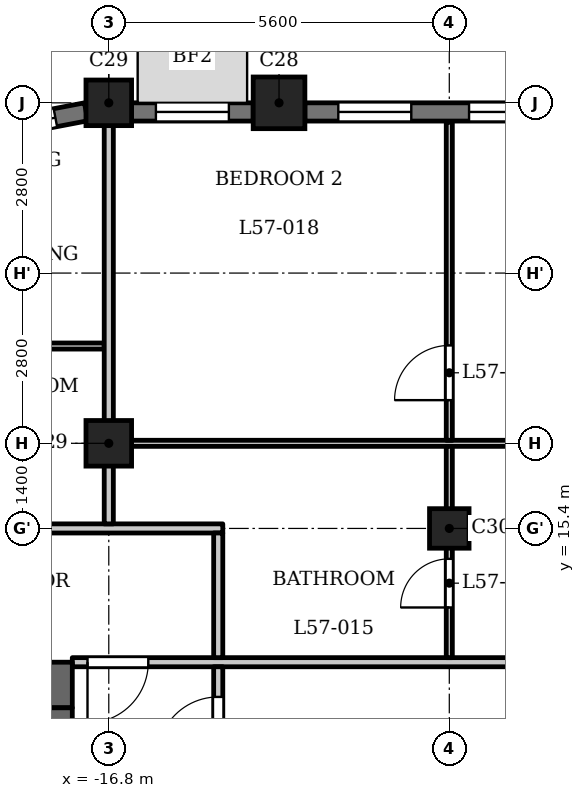
"""IFC4 building model, lengths in metres.
Left out: names, types, materials, properties, quantities, classifications, styles, units other than length and angle.
Written with IfcOpenShell. Run it as: python <this file> out.ifc"""

import sys

from ifc_helpers import new_model, si_unit, direction, frame, frame_2d, origin, origin_2d, place, context, subcontext, project, spatial, rectangle, extrude, element, fill, save


model = new_model("IFC4")
c1 = context("Model", 3, precision=1e-05, world=origin(), true_north=direction((0.0, 1.0)))
c2 = subcontext(c1, "Body", "Model", "MODEL_VIEW")
j1 = project(units=[si_unit("LENGTHUNIT", "METRE"), si_unit("PLANEANGLEUNIT", "RADIAN")], contexts=[c1])
p1 = place(None, origin())
s1 = spatial("IfcSite", under=j1, at=p1, CompositionType="ELEMENT")
p2 = place(p1, origin())
s2 = spatial("IfcBuilding", under=s1, at=p2, CompositionType="ELEMENT")
p3 = place(p2, frame((0.0, 0.0, 220.4)))
s3 = spatial("IfcBuildingStorey", under=s2, at=p3, CompositionType="ELEMENT", Elevation=220.4)
p4 = place(p3, frame((-14.0, 22.4, 0.0), z_axis=(0.0, 0.0, 1.0), x_axis=(1.0, 0.0, 0.0)))
e1 = element("IfcColumn", 1, at=p4, inside=s3, PredefinedType="COLUMN", context=c2, shape_type="SweptSolid", body=[
    extrude(rectangle(XDim=0.85, YDim=0.85, at=origin_2d()), origin(), (0.0, 0.0, 1.0), 3.5),
])
for number, where, z_axis, x_axis in (
    (2, (-16.8, 16.8, 0.0), (0.0, 0.0, 1.0), (1.0, 0.0, 0.0)),
    (3, (-16.8, 22.4, 0.0), (0.0, 0.0, 1.0), (1.0, 0.0, 0.0)),
):
    element("IfcColumn", number, at=place(p3, frame(where, z_axis=z_axis, x_axis=x_axis)), inside=s3, PredefinedType="COLUMN", context=c2, shape_type="SweptSolid", body=[
        extrude(rectangle(XDim=0.75, YDim=0.75, at=origin_2d()), origin(), (0.0, 0.0, 1.0), 3.5),
    ])
p5 = place(p3, frame((-11.2, 15.4, 0.0), z_axis=(0.0, 0.0, 1.0), x_axis=(1.0, 0.0, 0.0)))
e4 = element("IfcColumn", 4, at=p5, inside=s3, PredefinedType="COLUMN", context=c2, shape_type="SweptSolid", body=[
    extrude(rectangle(XDim=0.65, YDim=0.65, at=origin_2d()), origin(), (0.0, 0.0, 1.0), 3.5),
])
p6 = place(p3, frame((-8.825, 22.25, 0.0), z_axis=(0.0, 0.0, 1.0), x_axis=(-1.0, 0.0, 0.0)))
e5 = element("IfcWall", 5, at=p6, inside=s3, PredefinedType="SOLIDWALL", context=c2, shape_type="SweptSolid", body=[
    extrude(rectangle(XDim=4.75, YDim=0.3, at=frame_2d((2.375, 0.0))), origin(), (0.0, 0.0, 1.0), 2.5),
])
p7 = place(p6, frame((0.25, 0.0, 0.9)))
e6 = element("IfcOpeningElement", 6, at=p7, cuts=e5, PredefinedType="OPENING", context=c2, shape_type="SweptSolid", body=[
    extrude(rectangle(XDim=1.8, YDim=1.25, at=frame_2d((0.9, 0.625))), frame((0.0, 0.16, 0.0), z_axis=(0.0, -1.0, 0.0), x_axis=(1.0, 0.0, 0.0)), (0.0, 0.0, 1.0), 0.32),
])
p8 = place(p6, frame((3.0, 0.0, 0.6)))
e7 = element("IfcOpeningElement", 7, at=p8, cuts=e5, PredefinedType="OPENING", context=c2, shape_type="SweptSolid", body=[
    extrude(rectangle(XDim=1.2, YDim=1.55, at=frame_2d((0.6, 0.775))), frame((0.0, 0.16, 0.0), z_axis=(0.0, -1.0, 0.0), x_axis=(1.0, 0.0, 0.0)), (0.0, 0.0, 1.0), 0.32),
])
p9 = place(p3, frame((-14.425, 22.25, 0.0), z_axis=(0.0, 0.0, 1.0), x_axis=(-1.0, 0.0, 0.0)))
e8 = element("IfcWall", 8, at=p9, inside=s3, PredefinedType="SOLIDWALL", context=c2, shape_type="SweptSolid", body=[
    extrude(rectangle(XDim=2.0, YDim=0.3, at=frame_2d((1.0, 0.0))), origin(), (0.0, 0.0, 1.0), 2.5),
])
p10 = place(p9, frame((0.4, 0.0, 0.6)))
e9 = element("IfcOpeningElement", 9, at=p10, cuts=e8, PredefinedType="OPENING", context=c2, shape_type="SweptSolid", body=[
    extrude(rectangle(XDim=1.2, YDim=1.55, at=frame_2d((0.6, 0.775))), frame((0.0, 0.16, 0.0), z_axis=(0.0, -1.0, 0.0), x_axis=(1.0, 0.0, 0.0)), (0.0, 0.0, 1.0), 0.32),
])
p11 = place(p3, frame((-17.172, 22.253, 0.0), z_axis=(0.0, 0.0, 1.0), x_axis=(-0.982300037503, -0.187314271538, 0.0)))
e10 = element("IfcWall", 10, at=p11, inside=s3, PredefinedType="SOLIDWALL", context=c2, shape_type="SweptSolid", body=[
    extrude(rectangle(XDim=1.831, YDim=0.3, at=frame_2d((0.916, 0.0))), origin(), (0.0, 0.0, 1.0), 2.5),
])
p12 = place(p11, frame((0.516, 0.0, 0.6)))
e11 = element("IfcOpeningElement", 11, at=p12, cuts=e10, PredefinedType="OPENING", context=c2, shape_type="SweptSolid", body=[
    extrude(rectangle(XDim=0.8, YDim=1.55, at=frame_2d((0.4, 0.775))), frame((0.0, 0.16, 0.0), z_axis=(0.0, -1.0, 0.0), x_axis=(1.0, 0.0, 0.0)), (0.0, 0.0, 1.0), 0.32),
])
p13 = place(p3, frame((-17.4, 12.825, 0.0), z_axis=(0.0, 0.0, 1.0), x_axis=(-1.0, 0.0, 0.0)))
e12 = element("IfcWall", 12, at=p13, inside=s3, PredefinedType="SHEAR", context=c2, shape_type="SweptSolid", body=[
    extrude(rectangle(XDim=7.6, YDim=0.75, at=frame_2d((3.8, 0.0))), origin(), (0.0, 0.0, 1.0), 3.2),
])
p14 = place(p3, frame((-17.6, -12.45, 0.0), z_axis=(0.0, 0.0, 1.0), x_axis=(0.0, 1.0, 0.0)))
e13 = element("IfcWall", 13, at=p14, inside=s3, PredefinedType="SHEAR", context=c2, shape_type="SweptSolid", body=[
    extrude(rectangle(XDim=24.9, YDim=0.4, at=frame_2d((12.45, 0.0))), origin(), (0.0, 0.0, 1.0), 3.2),
])
p15 = place(p14, frame((6.85, 0.0, 0.0)))
e14 = element("IfcOpeningElement", 14, at=p15, cuts=e13, PredefinedType="OPENING", context=c2, shape_type="SweptSolid", body=[
    extrude(rectangle(XDim=0.9, YDim=2.1, at=frame_2d((0.45, 1.05))), frame((0.0, 0.21, 0.0), z_axis=(0.0, -1.0, 0.0), x_axis=(1.0, 0.0, 0.0)), (0.0, 0.0, 1.0), 0.42),
])
p16 = place(p14, frame((10.45, 0.0, 0.0)))
e15 = element("IfcOpeningElement", 15, at=p16, cuts=e13, PredefinedType="OPENING", context=c2, shape_type="SweptSolid", body=[
    extrude(rectangle(XDim=0.9, YDim=2.1, at=frame_2d((0.45, 1.05))), frame((0.0, 0.21, 0.0), z_axis=(0.0, -1.0, 0.0), x_axis=(1.0, 0.0, 0.0)), (0.0, 0.0, 1.0), 0.42),
])
p17 = place(p14, frame((15.6, 0.0, 0.0)))
e16 = element("IfcOpeningElement", 16, at=p17, cuts=e13, PredefinedType="OPENING", context=c2, shape_type="SweptSolid", body=[
    extrude(rectangle(XDim=1.1, YDim=2.1, at=frame_2d((0.55, 1.05))), frame((0.0, 0.21, 0.0), z_axis=(0.0, -1.0, 0.0), x_axis=(1.0, 0.0, 0.0)), (0.0, 0.0, 1.0), 0.42),
])
p18 = place(p14, frame((18.0, 0.0, 0.0)))
e17 = element("IfcOpeningElement", 17, at=p18, cuts=e13, PredefinedType="OPENING", context=c2, shape_type="SweptSolid", body=[
    extrude(rectangle(XDim=1.1, YDim=2.1, at=frame_2d((0.55, 1.05))), frame((0.0, 0.21, 0.0), z_axis=(0.0, -1.0, 0.0), x_axis=(1.0, 0.0, 0.0)), (0.0, 0.0, 1.0), 0.42),
])
p19 = place(p14, frame((23.025, 0.0, 0.0)))
e18 = element("IfcOpeningElement", 18, at=p19, cuts=e13, PredefinedType="OPENING", context=c2, shape_type="SweptSolid", body=[
    extrude(rectangle(XDim=1.1, YDim=2.1, at=frame_2d((0.55, 1.05))), frame((0.0, 0.21, 0.0), z_axis=(0.0, -1.0, 0.0), x_axis=(1.0, 0.0, 0.0)), (0.0, 0.0, 1.0), 0.42),
])
p20 = place(p14, frame((0.775, 0.0, 0.0)))
e19 = element("IfcOpeningElement", 19, at=p20, cuts=e13, PredefinedType="OPENING", context=c2, shape_type="SweptSolid", body=[
    extrude(rectangle(XDim=1.1, YDim=2.1, at=frame_2d((0.55, 1.05))), frame((0.0, 0.21, 0.0), z_axis=(0.0, -1.0, 0.0), x_axis=(1.0, 0.0, 0.0)), (0.0, 0.0, 1.0), 0.42),
])
p21 = place(p14, frame((12.925, 0.0, 0.0)))
e20 = element("IfcOpeningElement", 20, at=p21, cuts=e13, PredefinedType="OPENING", context=c2, shape_type="SweptSolid", body=[
    extrude(rectangle(XDim=1.8, YDim=2.1, at=frame_2d((0.9, 1.05))), frame((0.0, 0.21, 0.0), z_axis=(0.0, -1.0, 0.0), x_axis=(1.0, 0.0, 0.0)), (0.0, 0.0, 1.0), 0.42),
])
p22 = place(p3, frame((-17.4, 13.2, 0.0), z_axis=(0.0, 0.0, 1.0), x_axis=(1.0, 0.0, 0.0)))
e21 = element("IfcWall", 21, at=p22, inside=s3, PredefinedType="PARTITIONING", context=c2, shape_type="SweptSolid", body=[
    extrude(rectangle(XDim=34.8, YDim=0.15, at=frame_2d((17.4, 0.0))), origin(), (0.0, 0.0, 1.0), 3.2),
])
p23 = place(p22, frame((0.25, 0.0, 0.0)))
e22 = element("IfcOpeningElement", 22, at=p23, cuts=e21, PredefinedType="OPENING", context=c2, shape_type="SweptSolid", body=[
    extrude(rectangle(XDim=1.0, YDim=2.1, at=frame_2d((0.5, 1.05))), frame((0.0, 0.085, 0.0), z_axis=(0.0, -1.0, 0.0), x_axis=(1.0, 0.0, 0.0)), (0.0, 0.0, 1.0), 0.17),
])
p24 = place(p22, frame((33.65, 0.0, 0.0)))
e23 = element("IfcOpeningElement", 23, at=p24, cuts=e21, PredefinedType="OPENING", context=c2, shape_type="SweptSolid", body=[
    extrude(rectangle(XDim=1.0, YDim=2.1, at=frame_2d((0.5, 1.05))), frame((0.0, 0.085, 0.0), z_axis=(0.0, -1.0, 0.0), x_axis=(1.0, 0.0, 0.0)), (0.0, 0.0, 1.0), 0.17),
])
p25 = place(p22, frame((15.75, 0.0, 0.0)))
e24 = element("IfcOpeningElement", 24, at=p25, cuts=e21, PredefinedType="OPENING", context=c2, shape_type="SweptSolid", body=[
    extrude(rectangle(XDim=1.0, YDim=2.1, at=frame_2d((0.5, 1.05))), frame((0.0, 0.085, 0.0), z_axis=(0.0, -1.0, 0.0), x_axis=(1.0, 0.0, 0.0)), (0.0, 0.0, 1.0), 0.17),
])
p26 = place(p22, frame((26.95, 0.0, 0.0)))
e25 = element("IfcOpeningElement", 25, at=p26, cuts=e21, PredefinedType="OPENING", context=c2, shape_type="SweptSolid", body=[
    extrude(rectangle(XDim=1.0, YDim=2.1, at=frame_2d((0.5, 1.05))), frame((0.0, 0.085, 0.0), z_axis=(0.0, -1.0, 0.0), x_axis=(1.0, 0.0, 0.0)), (0.0, 0.0, 1.0), 0.17),
])
p27 = place(p22, frame((29.75, 0.0, 0.0)))
e26 = element("IfcOpeningElement", 26, at=p27, cuts=e21, PredefinedType="OPENING", context=c2, shape_type="SweptSolid", body=[
    extrude(rectangle(XDim=1.0, YDim=2.1, at=frame_2d((0.5, 1.05))), frame((0.0, 0.085, 0.0), z_axis=(0.0, -1.0, 0.0), x_axis=(1.0, 0.0, 0.0)), (0.0, 0.0, 1.0), 0.17),
])
p28 = place(p3, frame((-24.684, 15.4, 0.0), z_axis=(0.0, 0.0, 1.0), x_axis=(1.0, 0.0, 0.0)))
e27 = element("IfcWall", 27, at=p28, inside=s3, PredefinedType="PARTITIONING", context=c2, shape_type="SweptSolid", body=[
    extrude(rectangle(XDim=9.759, YDim=0.15, at=frame_2d((4.879, 0.0))), origin(), (0.0, 0.0, 1.0), 3.2),
])
p29 = place(p28, frame((0.984, 0.0, 0.0)))
e28 = element("IfcOpeningElement", 28, at=p29, cuts=e27, PredefinedType="OPENING", context=c2, shape_type="SweptSolid", body=[
    extrude(rectangle(XDim=1.0, YDim=2.1, at=frame_2d((0.5, 1.05))), frame((0.0, 0.085, 0.0), z_axis=(0.0, -1.0, 0.0), x_axis=(1.0, 0.0, 0.0)), (0.0, 0.0, 1.0), 0.17),
])
p30 = place(p3, frame((-16.725, 16.8, 0.0), z_axis=(0.0, 0.0, 1.0), x_axis=(1.0, 0.0, 0.0)))
e29 = element("IfcWall", 29, at=p30, inside=s3, PredefinedType="PARTITIONING", context=c2, shape_type="SweptSolid", body=[
    extrude(rectangle(XDim=33.45, YDim=0.1, at=frame_2d((16.725, 0.0))), origin(), (0.0, 0.0, 1.0), 3.2),
])
p31 = place(p30, frame((11.675, 0.0, 0.0)))
e30 = element("IfcOpeningElement", 30, at=p31, cuts=e29, PredefinedType="OPENING", context=c2, shape_type="SweptSolid", body=[
    extrude(rectangle(XDim=0.9, YDim=2.1, at=frame_2d((0.45, 1.05))), frame((0.0, 0.06, 0.0), z_axis=(0.0, -1.0, 0.0), x_axis=(1.0, 0.0, 0.0)), (0.0, 0.0, 1.0), 0.12),
])
p32 = place(p30, frame((9.575, 0.0, 0.0)))
e31 = element("IfcOpeningElement", 31, at=p32, cuts=e29, PredefinedType="OPENING", context=c2, shape_type="SweptSolid", body=[
    extrude(rectangle(XDim=0.9, YDim=2.1, at=frame_2d((0.45, 1.05))), frame((0.0, 0.06, 0.0), z_axis=(0.0, -1.0, 0.0), x_axis=(1.0, 0.0, 0.0)), (0.0, 0.0, 1.0), 0.12),
])
p33 = place(p30, frame((17.375, 0.0, 0.0)))
e32 = element("IfcOpeningElement", 32, at=p33, cuts=e29, PredefinedType="OPENING", context=c2, shape_type="SweptSolid", body=[
    extrude(rectangle(XDim=0.8, YDim=2.1, at=frame_2d((0.4, 1.05))), frame((0.0, 0.06, 0.0), z_axis=(0.0, -1.0, 0.0), x_axis=(1.0, 0.0, 0.0)), (0.0, 0.0, 1.0), 0.12),
])
p34 = place(p30, frame((19.525, 0.0, 0.0)))
e33 = element("IfcOpeningElement", 33, at=p34, cuts=e29, PredefinedType="OPENING", context=c2, shape_type="SweptSolid", body=[
    extrude(rectangle(XDim=0.9, YDim=2.1, at=frame_2d((0.45, 1.05))), frame((0.0, 0.06, 0.0), z_axis=(0.0, -1.0, 0.0), x_axis=(1.0, 0.0, 0.0)), (0.0, 0.0, 1.0), 0.12),
])
p35 = place(p30, frame((23.775, 0.0, 0.0)))
e34 = element("IfcOpeningElement", 34, at=p35, cuts=e29, PredefinedType="OPENING", context=c2, shape_type="SweptSolid", body=[
    extrude(rectangle(XDim=0.9, YDim=2.1, at=frame_2d((0.45, 1.05))), frame((0.0, 0.06, 0.0), z_axis=(0.0, -1.0, 0.0), x_axis=(1.0, 0.0, 0.0)), (0.0, 0.0, 1.0), 0.12),
])
p36 = place(p30, frame((26.125, 0.0, 0.0)))
e35 = element("IfcOpeningElement", 35, at=p36, cuts=e29, PredefinedType="OPENING", context=c2, shape_type="SweptSolid", body=[
    extrude(rectangle(XDim=0.9, YDim=2.1, at=frame_2d((0.45, 1.05))), frame((0.0, 0.06, 0.0), z_axis=(0.0, -1.0, 0.0), x_axis=(1.0, 0.0, 0.0)), (0.0, 0.0, 1.0), 0.12),
])
p37 = place(p30, frame((32.075, 0.0, 0.0)))
e36 = element("IfcOpeningElement", 36, at=p37, cuts=e29, PredefinedType="OPENING", context=c2, shape_type="SweptSolid", body=[
    extrude(rectangle(XDim=0.8, YDim=2.1, at=frame_2d((0.4, 1.05))), frame((0.0, 0.06, 0.0), z_axis=(0.0, -1.0, 0.0), x_axis=(1.0, 0.0, 0.0)), (0.0, 0.0, 1.0), 0.12),
])
p38 = place(p30, frame((29.175, 0.0, 0.0)))
e37 = element("IfcOpeningElement", 37, at=p38, cuts=e29, PredefinedType="OPENING", context=c2, shape_type="SweptSolid", body=[
    extrude(rectangle(XDim=0.9, YDim=2.1, at=frame_2d((0.45, 1.05))), frame((0.0, 0.06, 0.0), z_axis=(0.0, -1.0, 0.0), x_axis=(1.0, 0.0, 0.0)), (0.0, 0.0, 1.0), 0.12),
])
p39 = place(p3, frame((-23.43, 18.4, 0.0), z_axis=(0.0, 0.0, 1.0), x_axis=(1.0, 0.0, 0.0)))
e38 = element("IfcWall", 38, at=p39, inside=s3, PredefinedType="PARTITIONING", context=c2, shape_type="SweptSolid", body=[
    extrude(rectangle(XDim=6.555, YDim=0.1, at=frame_2d((3.277, 0.0))), origin(), (0.0, 0.0, 1.0), 3.2),
])
p40 = place(p39, frame((4.28, 0.0, 0.0)))
e39 = element("IfcOpeningElement", 39, at=p40, cuts=e38, PredefinedType="OPENING", context=c2, shape_type="SweptSolid", body=[
    extrude(rectangle(XDim=0.8, YDim=2.1, at=frame_2d((0.4, 1.05))), frame((0.0, 0.06, 0.0), z_axis=(0.0, -1.0, 0.0), x_axis=(1.0, 0.0, 0.0)), (0.0, 0.0, 1.0), 0.12),
])
p41 = place(p39, frame((1.33, 0.0, 0.0)))
e40 = element("IfcOpeningElement", 40, at=p41, cuts=e38, PredefinedType="OPENING", context=c2, shape_type="SweptSolid", body=[
    extrude(rectangle(XDim=0.9, YDim=2.1, at=frame_2d((0.45, 1.05))), frame((0.0, 0.06, 0.0), z_axis=(0.0, -1.0, 0.0), x_axis=(1.0, 0.0, 0.0)), (0.0, 0.0, 1.0), 0.12),
])
p42 = place(p3, frame((-16.8, 15.475, 0.0), z_axis=(0.0, 0.0, 1.0), x_axis=(0.0, 1.0, 0.0)))
e41 = element("IfcWall", 41, at=p42, inside=s3, PredefinedType="PARTITIONING", context=c2, shape_type="SweptSolid", body=[
    extrude(rectangle(XDim=6.835, YDim=0.15, at=frame_2d((3.417, 0.0))), origin(), (0.0, 0.0, 1.0), 2.55),
])
p43 = place(p3, frame((-15.0, 6.769, 0.0), z_axis=(0.0, 0.0, 1.0), x_axis=(0.0, 1.0, 0.0)))
e42 = element("IfcWall", 42, at=p43, inside=s3, PredefinedType="PARTITIONING", context=c2, shape_type="SweptSolid", body=[
    extrude(rectangle(XDim=6.356, YDim=0.15, at=frame_2d((3.178, 0.0))), origin(), (0.0, 0.0, 1.0), 3.2),
])
p44 = place(p43, frame((4.86, 0.0, 0.0)))
e43 = element("IfcOpeningElement", 43, at=p44, cuts=e42, PredefinedType="OPENING", context=c2, shape_type="SweptSolid", body=[
    extrude(rectangle(XDim=1.0, YDim=2.1, at=frame_2d((0.5, 1.05))), frame((0.0, 0.085, 0.0), z_axis=(0.0, -1.0, 0.0), x_axis=(1.0, 0.0, 0.0)), (0.0, 0.0, 1.0), 0.17),
])
p45 = place(p3, frame((-15.0, 13.275, 0.0), z_axis=(0.0, 0.0, 1.0), x_axis=(0.0, 1.0, 0.0)))
e44 = element("IfcWall", 44, at=p45, inside=s3, PredefinedType="PARTITIONING", context=c2, shape_type="SweptSolid", body=[
    extrude(rectangle(XDim=2.05, YDim=0.15, at=frame_2d((1.025, 0.0))), origin(), (0.0, 0.0, 1.0), 3.2),
])
p46 = place(p3, frame((-11.2, 13.275, 0.0), z_axis=(0.0, 0.0, 1.0), x_axis=(0.0, 1.0, 0.0)))
e45 = element("IfcWall", 45, at=p46, inside=s3, PredefinedType="PARTITIONING", context=c2, shape_type="SweptSolid", body=[
    extrude(rectangle(XDim=3.475, YDim=0.1, at=frame_2d((1.738, 0.0))), origin(), (0.0, 0.0, 1.0), 3.2),
])
p47 = place(p46, frame((0.825, 0.0, 0.0)))
e46 = element("IfcOpeningElement", 46, at=p47, cuts=e45, PredefinedType="OPENING", context=c2, shape_type="SweptSolid", body=[
    extrude(rectangle(XDim=0.8, YDim=2.1, at=frame_2d((0.4, 1.05))), frame((0.0, 0.06, 0.0), z_axis=(0.0, -1.0, 0.0), x_axis=(1.0, 0.0, 0.0)), (0.0, 0.0, 1.0), 0.12),
])
p48 = place(p3, frame((-11.2, 16.85, 0.0), z_axis=(0.0, 0.0, 1.0), x_axis=(0.0, 1.0, 0.0)))
e47 = element("IfcWall", 47, at=p48, inside=s3, PredefinedType="PARTITIONING", context=c2, shape_type="SweptSolid", body=[
    extrude(rectangle(XDim=5.23, YDim=0.1, at=frame_2d((2.615, 0.0))), origin(), (0.0, 0.0, 1.0), 3.2),
])
p49 = place(p48, frame((0.66, 0.0, 0.0)))
e48 = element("IfcOpeningElement", 48, at=p49, cuts=e47, PredefinedType="OPENING", context=c2, shape_type="SweptSolid", body=[
    extrude(rectangle(XDim=0.9, YDim=2.1, at=frame_2d((0.45, 1.05))), frame((0.0, 0.06, 0.0), z_axis=(0.0, -1.0, 0.0), x_axis=(1.0, 0.0, 0.0)), (0.0, 0.0, 1.0), 0.12),
])
p50 = place(p44, origin())
e49 = element("IfcDoor", 49, at=p50, inside=s3, OperationType="SINGLE_SWING_RIGHT", PredefinedType="DOOR", context=c2, shape_type="SweptSolid", body=[
    extrude(rectangle(XDim=1.0, YDim=2.1, at=frame_2d((0.5, 1.05))), frame((0.0, 0.025, 0.0), z_axis=(0.0, -1.0, 0.0), x_axis=(1.0, 0.0, 0.0)), (0.0, 0.0, 1.0), 0.05),
])
fill(e43, e49)
p51 = place(p23, origin())
e50 = element("IfcDoor", 50, at=p51, inside=s3, OperationType="SINGLE_SWING_LEFT", PredefinedType="DOOR", context=c2, shape_type="SweptSolid", body=[
    extrude(rectangle(XDim=1.0, YDim=2.1, at=frame_2d((0.5, 1.05))), frame((0.0, 0.025, 0.0), z_axis=(0.0, -1.0, 0.0), x_axis=(1.0, 0.0, 0.0)), (0.0, 0.0, 1.0), 0.05),
])
fill(e22, e50)
p52 = place(p47, origin())
e51 = element("IfcDoor", 51, at=p52, inside=s3, OperationType="SINGLE_SWING_RIGHT", PredefinedType="DOOR", context=c2, shape_type="SweptSolid", body=[
    extrude(rectangle(XDim=0.8, YDim=2.1, at=frame_2d((0.4, 1.05))), frame((0.0, 0.025, 0.0), z_axis=(0.0, -1.0, 0.0), x_axis=(1.0, 0.0, 0.0)), (0.0, 0.0, 1.0), 0.05),
])
fill(e46, e51)
p53 = place(p49, origin())
e52 = element("IfcDoor", 52, at=p53, inside=s3, OperationType="SINGLE_SWING_RIGHT", PredefinedType="DOOR", context=c2, shape_type="SweptSolid", body=[
    extrude(rectangle(XDim=0.9, YDim=2.1, at=frame_2d((0.45, 1.05))), frame((0.0, 0.025, 0.0), z_axis=(0.0, -1.0, 0.0), x_axis=(1.0, 0.0, 0.0)), (0.0, 0.0, 1.0), 0.05),
])
fill(e48, e52)
p54 = place(p7, origin())
e53 = element("IfcWindow", 53, at=p54, inside=s3, PartitioningType="SINGLE_PANEL", PredefinedType="WINDOW", context=c2, shape_type="SweptSolid", body=[
    extrude(rectangle(XDim=1.8, YDim=1.25, at=frame_2d((0.9, 0.625))), frame((0.0, 0.03, 0.0), z_axis=(0.0, -1.0, 0.0), x_axis=(1.0, 0.0, 0.0)), (0.0, 0.0, 1.0), 0.06),
])
fill(e6, e53)
p55 = place(p8, origin())
e54 = element("IfcWindow", 54, at=p55, inside=s3, PartitioningType="SINGLE_PANEL", PredefinedType="WINDOW", context=c2, shape_type="SweptSolid", body=[
    extrude(rectangle(XDim=1.2, YDim=1.55, at=frame_2d((0.6, 0.775))), frame((0.0, 0.03, 0.0), z_axis=(0.0, -1.0, 0.0), x_axis=(1.0, 0.0, 0.0)), (0.0, 0.0, 1.0), 0.06),
])
fill(e7, e54)
p56 = place(p10, origin())
e55 = element("IfcWindow", 55, at=p56, inside=s3, PartitioningType="SINGLE_PANEL", PredefinedType="WINDOW", context=c2, shape_type="SweptSolid", body=[
    extrude(rectangle(XDim=1.2, YDim=1.55, at=frame_2d((0.6, 0.775))), frame((0.0, 0.03, 0.0), z_axis=(0.0, -1.0, 0.0), x_axis=(1.0, 0.0, 0.0)), (0.0, 0.0, 1.0), 0.06),
])
fill(e9, e55)
p57 = place(p12, origin())
e56 = element("IfcWindow", 56, at=p57, inside=s3, PartitioningType="SINGLE_PANEL", PredefinedType="WINDOW", context=c2, shape_type="SweptSolid", body=[
    extrude(rectangle(XDim=0.8, YDim=1.55, at=frame_2d((0.4, 0.775))), frame((0.0, 0.03, 0.0), z_axis=(0.0, -1.0, 0.0), x_axis=(1.0, 0.0, 0.0)), (0.0, 0.0, 1.0), 0.06),
])
fill(e11, e56)
save(model, sys.argv[1])
